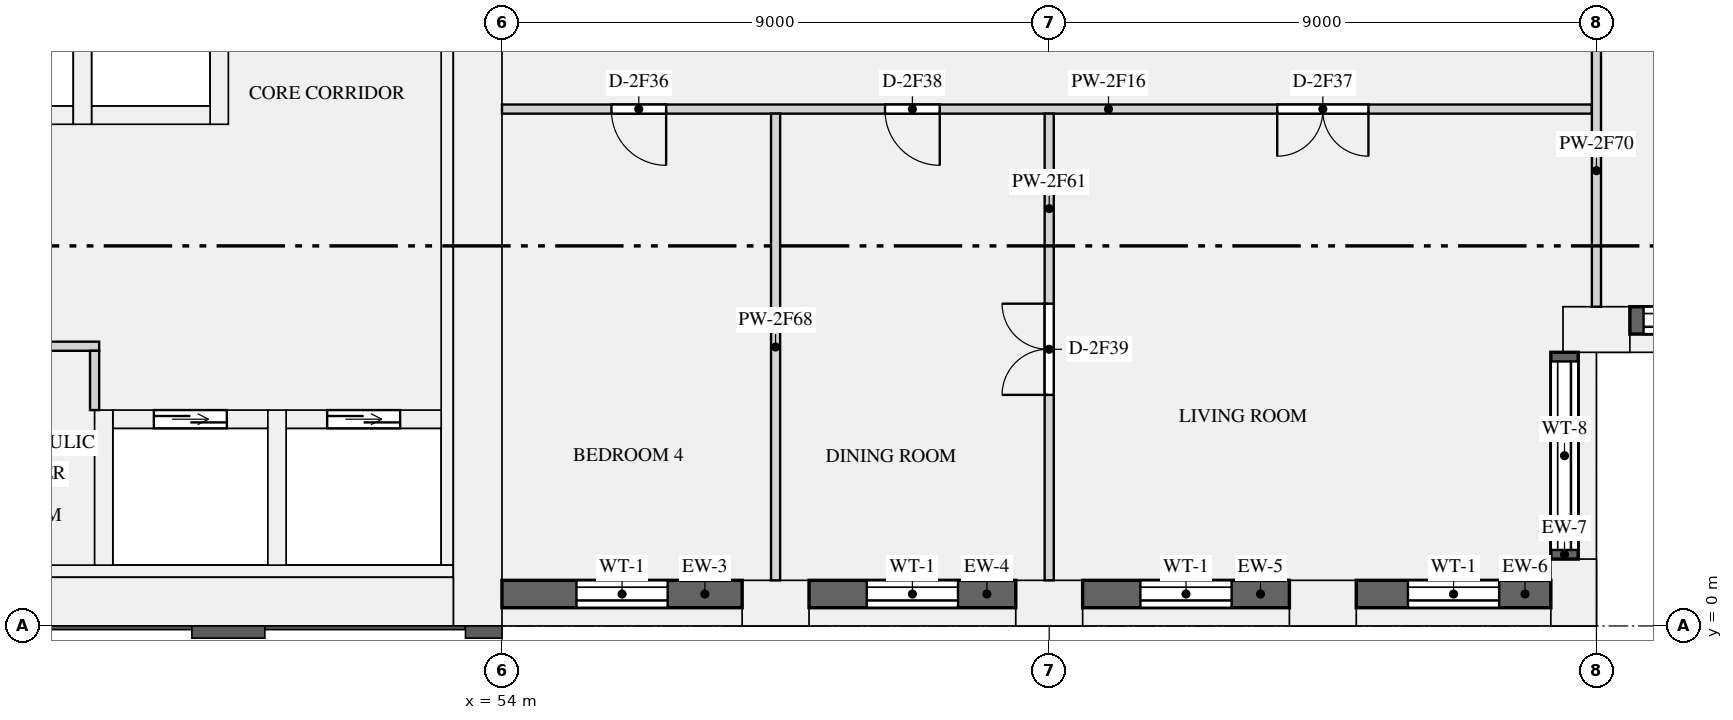
"""IFC4 building model, lengths in metres.
Left out: names, types, materials, properties, quantities, classifications, styles, units other than length and angle.
Written with IfcOpenShell. Run it as: python <this file> out.ifc"""

import sys

from ifc_helpers import new_model, si_unit, direction, frame, frame_2d, origin, origin_2d, place, context, subcontext, project, spatial, rectangle, extrude, element, fill, save


model = new_model("IFC4")
c1 = context("Model", 3, precision=1e-05, world=origin(), true_north=direction((0.0, 1.0)))
c2 = subcontext(c1, "Body", "Model", "MODEL_VIEW")
j1 = project(units=[si_unit("LENGTHUNIT", "METRE"), si_unit("PLANEANGLEUNIT", "RADIAN")], contexts=[c1])
p1 = place(None, origin())
s1 = spatial("IfcSite", under=j1, at=p1, CompositionType="ELEMENT")
p2 = place(p1, origin())
s2 = spatial("IfcBuilding", under=s1, at=p2, CompositionType="ELEMENT")
p3 = place(p2, frame((0.0, 0.0, 127.65)))
s3 = spatial("IfcBuildingStorey", under=s2, at=p3, CompositionType="ELEMENT", Elevation=127.65)
for number, where, z_axis, x_axis in (
    (1, (58.5, 0.375, 0.0), (0.0, 0.0, 1.0), (1.0, 0.0, 0.0)),
    (2, (63.0, 0.375, 0.0), (0.0, 0.0, 1.0), (1.0, 0.0, 0.0)),
    (3, (67.5, 0.375, 0.0), (0.0, 0.0, 1.0), (1.0, 0.0, 0.0)),
    (4, (71.625, 0.55, 0.0), (0.0, 0.0, 1.0), (0.0, 1.0, 0.0)),
    (5, (72.0, 4.875, 0.0), (0.0, 0.0, 1.0), (1.0, 0.0, 0.0)),
):
    element("IfcColumn", number, at=place(p3, frame(where, z_axis=z_axis, x_axis=x_axis)), inside=s3, PredefinedType="USERDEFINED", context=c2, shape_type="SweptSolid", body=[
        extrude(rectangle(XDim=1.1, YDim=0.75, at=origin_2d()), origin(), (0.0, 0.0, 1.0), 3.15),
    ])
p4 = place(p3, frame((53.6, 0.0, 0.0), z_axis=(0.0, 0.0, 1.0), x_axis=(0.0, 1.0, 0.0)))
e6 = element("IfcWall", 6, at=p4, inside=s3, PredefinedType="SHEAR", context=c2, shape_type="SweptSolid", body=[
    extrude(rectangle(XDim=12.5, YDim=0.8, at=frame_2d((6.25, 0.0))), origin(), (0.0, 0.0, 1.0), 3.15),
])
p5 = place(p3, frame((18.8, 0.4, 0.0), z_axis=(0.0, 0.0, 1.0), x_axis=(1.0, 0.0, 0.0)))
e7 = element("IfcWall", 7, at=p5, inside=s3, PredefinedType="SHEAR", context=c2, shape_type="SweptSolid", body=[
    extrude(rectangle(XDim=34.4, YDim=0.8, at=frame_2d((17.2, 0.0))), origin(), (0.0, 0.0, 1.0), 3.15),
])
p6 = place(p3, frame((53.1, 1.0, 0.0), z_axis=(0.0, 0.0, 1.0), x_axis=(0.0, 1.0, 0.0)))
e8 = element("IfcWall", 8, at=p6, inside=s3, PredefinedType="SHEAR", context=c2, shape_type="SweptSolid", body=[
    extrude(rectangle(XDim=10.9, YDim=0.2, at=frame_2d((5.45, 0.0))), origin(), (0.0, 0.0, 1.0), 3.15),
])
p7 = place(p3, frame((18.8, 0.9, 0.0), z_axis=(0.0, 0.0, 1.0), x_axis=(1.0, 0.0, 0.0)))
e9 = element("IfcWall", 9, at=p7, inside=s3, PredefinedType="SHEAR", context=c2, shape_type="SweptSolid", body=[
    extrude(rectangle(XDim=34.4, YDim=0.2, at=frame_2d((17.2, 0.0))), origin(), (0.0, 0.0, 1.0), 3.15),
])
for number, where, z_axis, x_axis in (
    (10, (45.0, 8.4, 0.0), (0.0, 0.0, 1.0), (1.0, 0.0, 0.0)),
    (11, (47.25, 8.4, 0.0), (0.0, 0.0, 1.0), (1.0, 0.0, 0.0)),
):
    element("IfcWall", number, at=place(p3, frame(where, z_axis=z_axis, x_axis=x_axis)), inside=s3, PredefinedType="SHEAR", context=c2, shape_type="SweptSolid", body=[
        extrude(rectangle(XDim=1.95, YDim=0.3, at=frame_2d((0.975, 0.0))), origin(), (0.0, 0.0, 1.0), 3.15),
    ])
for number, where, z_axis, x_axis in (
    (12, (47.1, 8.25, 0.0), (0.0, 0.0, 1.0), (0.0, 1.0, 0.0)),
    (13, (49.35, 8.25, 0.0), (0.0, 0.0, 1.0), (0.0, 1.0, 0.0)),
):
    element("IfcWall", number, at=place(p3, frame(where, z_axis=z_axis, x_axis=x_axis)), inside=s3, PredefinedType="SHEAR", context=c2, shape_type="SweptSolid", body=[
        extrude(rectangle(XDim=3.65, YDim=0.3, at=frame_2d((1.825, 0.0))), origin(), (0.0, 0.0, 1.0), 3.15),
    ])
p8 = place(p3, frame((47.6, 3.4, 0.0), z_axis=(0.0, 0.0, 1.0), x_axis=(1.0, 0.0, 0.0)))
e14 = element("IfcWall", 14, at=p8, inside=s3, PredefinedType="SHEAR", context=c2, shape_type="SweptSolid", body=[
    extrude(rectangle(XDim=2.55, YDim=0.3, at=frame_2d((1.275, 0.0))), origin(), (0.0, 0.0, 1.0), 3.15),
])
p9 = place(p8, frame((0.675, 0.0, 0.0)))
e15 = element("IfcOpeningElement", 15, at=p9, cuts=e14, PredefinedType="OPENING", context=c2, shape_type="SweptSolid", body=[
    extrude(rectangle(XDim=1.2, YDim=2.1, at=frame_2d((0.6, 1.05))), frame((0.0, 0.16, 0.0), z_axis=(0.0, -1.0, 0.0), x_axis=(1.0, 0.0, 0.0)), (0.0, 0.0, 1.0), 0.32),
])
p10 = place(p3, frame((47.45, 1.0, 0.0), z_axis=(0.0, 0.0, 1.0), x_axis=(0.0, 1.0, 0.0)))
e16 = element("IfcWall", 16, at=p10, inside=s3, PredefinedType="SHEAR", context=c2, shape_type="SweptSolid", body=[
    extrude(rectangle(XDim=2.55, YDim=0.3, at=frame_2d((1.275, 0.0))), origin(), (0.0, 0.0, 1.0), 3.15),
])
p11 = place(p3, frame((50.45, 3.4, 0.0), z_axis=(0.0, 0.0, 1.0), x_axis=(1.0, 0.0, 0.0)))
e17 = element("IfcWall", 17, at=p11, inside=s3, PredefinedType="SHEAR", context=c2, shape_type="SweptSolid", body=[
    extrude(rectangle(XDim=2.55, YDim=0.3, at=frame_2d((1.275, 0.0))), origin(), (0.0, 0.0, 1.0), 3.15),
])
p12 = place(p11, frame((0.675, 0.0, 0.0)))
e18 = element("IfcOpeningElement", 18, at=p12, cuts=e17, PredefinedType="OPENING", context=c2, shape_type="SweptSolid", body=[
    extrude(rectangle(XDim=1.2, YDim=2.1, at=frame_2d((0.6, 1.05))), frame((0.0, 0.16, 0.0), z_axis=(0.0, -1.0, 0.0), x_axis=(1.0, 0.0, 0.0)), (0.0, 0.0, 1.0), 0.32),
])
p13 = place(p3, frame((50.3, 1.0, 0.0), z_axis=(0.0, 0.0, 1.0), x_axis=(0.0, 1.0, 0.0)))
e19 = element("IfcWall", 19, at=p13, inside=s3, PredefinedType="SHEAR", context=c2, shape_type="SweptSolid", body=[
    extrude(rectangle(XDim=2.55, YDim=0.3, at=frame_2d((1.275, 0.0))), origin(), (0.0, 0.0, 1.0), 3.15),
])
p14 = place(p3, frame((54.0, 0.525, 0.9), z_axis=(0.0, 0.0, 1.0), x_axis=(1.0, 0.0, 0.0)))
e20 = element("IfcWall", 20, at=p14, inside=s3, PredefinedType="SOLIDWALL", context=c2, shape_type="SweptSolid", body=[
    extrude(rectangle(XDim=3.95, YDim=0.45, at=frame_2d((1.975, 0.0))), origin(), (0.0, 0.0, 1.0), 1.75),
])
p15 = place(p14, frame((1.225, 0.0, 0.15)))
e21 = element("IfcOpeningElement", 21, at=p15, cuts=e20, PredefinedType="OPENING", context=c2, shape_type="SweptSolid", body=[
    extrude(rectangle(XDim=1.5, YDim=1.5, at=frame_2d((0.75, 0.75))), frame((0.0, 0.235, 0.0), z_axis=(0.0, -1.0, 0.0), x_axis=(1.0, 0.0, 0.0)), (0.0, 0.0, 1.0), 0.47),
])
p16 = place(p3, frame((59.05, 0.525, 0.9), z_axis=(0.0, 0.0, 1.0), x_axis=(1.0, 0.0, 0.0)))
e22 = element("IfcWall", 22, at=p16, inside=s3, PredefinedType="SOLIDWALL", context=c2, shape_type="SweptSolid", body=[
    extrude(rectangle(XDim=3.4, YDim=0.45, at=frame_2d((1.7, 0.0))), origin(), (0.0, 0.0, 1.0), 1.75),
])
p17 = place(p16, frame((0.95, 0.0, 0.15)))
e23 = element("IfcOpeningElement", 23, at=p17, cuts=e22, PredefinedType="OPENING", context=c2, shape_type="SweptSolid", body=[
    extrude(rectangle(XDim=1.5, YDim=1.5, at=frame_2d((0.75, 0.75))), frame((0.0, 0.235, 0.0), z_axis=(0.0, -1.0, 0.0), x_axis=(1.0, 0.0, 0.0)), (0.0, 0.0, 1.0), 0.47),
])
p18 = place(p3, frame((63.55, 0.525, 0.9), z_axis=(0.0, 0.0, 1.0), x_axis=(1.0, 0.0, 0.0)))
e24 = element("IfcWall", 24, at=p18, inside=s3, PredefinedType="SOLIDWALL", context=c2, shape_type="SweptSolid", body=[
    extrude(rectangle(XDim=3.4, YDim=0.45, at=frame_2d((1.7, 0.0))), origin(), (0.0, 0.0, 1.0), 1.75),
])
p19 = place(p18, frame((0.95, 0.0, 0.15)))
e25 = element("IfcOpeningElement", 25, at=p19, cuts=e24, PredefinedType="OPENING", context=c2, shape_type="SweptSolid", body=[
    extrude(rectangle(XDim=1.5, YDim=1.5, at=frame_2d((0.75, 0.75))), frame((0.0, 0.235, 0.0), z_axis=(0.0, -1.0, 0.0), x_axis=(1.0, 0.0, 0.0)), (0.0, 0.0, 1.0), 0.47),
])
p20 = place(p3, frame((68.05, 0.525, 0.9), z_axis=(0.0, 0.0, 1.0), x_axis=(1.0, 0.0, 0.0)))
e26 = element("IfcWall", 26, at=p20, inside=s3, PredefinedType="SOLIDWALL", context=c2, shape_type="SweptSolid", body=[
    extrude(rectangle(XDim=3.2, YDim=0.45, at=frame_2d((1.6, 0.0))), origin(), (0.0, 0.0, 1.0), 1.75),
])
p21 = place(p20, frame((0.85, 0.0, 0.15)))
e27 = element("IfcOpeningElement", 27, at=p21, cuts=e26, PredefinedType="OPENING", context=c2, shape_type="SweptSolid", body=[
    extrude(rectangle(XDim=1.5, YDim=1.5, at=frame_2d((0.75, 0.75))), frame((0.0, 0.235, 0.0), z_axis=(0.0, -1.0, 0.0), x_axis=(1.0, 0.0, 0.0)), (0.0, 0.0, 1.0), 0.47),
])
p22 = place(p3, frame((71.475, 1.1, 0.9), z_axis=(0.0, 0.0, 1.0), x_axis=(0.0, 1.0, 0.0)))
e28 = element("IfcWall", 28, at=p22, inside=s3, PredefinedType="SOLIDWALL", context=c2, shape_type="SweptSolid", body=[
    extrude(rectangle(XDim=3.4, YDim=0.45, at=frame_2d((1.7, 0.0))), origin(), (0.0, 0.0, 1.0), 1.75),
])
p23 = place(p22, frame((0.15, 0.0, 0.15)))
e29 = element("IfcOpeningElement", 29, at=p23, cuts=e28, PredefinedType="OPENING", context=c2, shape_type="SweptSolid", body=[
    extrude(rectangle(XDim=3.1, YDim=1.5, at=frame_2d((1.55, 0.75))), frame((0.0, 0.235, 0.0), z_axis=(0.0, -1.0, 0.0), x_axis=(1.0, 0.0, 0.0)), (0.0, 0.0, 1.0), 0.47),
])
p24 = place(p3, frame((72.55, 5.025, 0.9), z_axis=(0.0, 0.0, 1.0), x_axis=(1.0, 0.0, 0.0)))
e30 = element("IfcWall", 30, at=p24, inside=s3, PredefinedType="SOLIDWALL", context=c2, shape_type="SweptSolid", body=[
    extrude(rectangle(XDim=3.2, YDim=0.45, at=frame_2d((1.6, 0.0))), origin(), (0.0, 0.0, 1.0), 1.75),
])
p25 = place(p24, frame((0.225, 0.0, 0.15)))
e31 = element("IfcOpeningElement", 31, at=p25, cuts=e30, PredefinedType="OPENING", context=c2, shape_type="SweptSolid", body=[
    extrude(rectangle(XDim=2.75, YDim=1.5, at=frame_2d((1.375, 0.75))), frame((0.0, 0.235, 0.0), z_axis=(0.0, -1.0, 0.0), x_axis=(1.0, 0.0, 0.0)), (0.0, 0.0, 1.0), 0.47),
])
p26 = place(p3, frame((44.7, 4.6, 0.0), z_axis=(0.0, 0.0, 1.0), x_axis=(1.0, 0.0, 0.0)))
e32 = element("IfcWall", 32, at=p26, inside=s3, PredefinedType="PARTITIONING", context=c2, shape_type="SweptSolid", body=[
    extrude(rectangle(XDim=2.675, YDim=0.15, at=frame_2d((1.337, 0.0))), origin(), (0.0, 0.0, 1.0), 2.65),
])
p27 = place(p26, frame((0.35, 0.0, 0.0)))
e33 = element("IfcOpeningElement", 33, at=p27, cuts=e32, PredefinedType="OPENING", context=c2, shape_type="SweptSolid", body=[
    extrude(rectangle(XDim=0.9, YDim=2.1, at=frame_2d((0.45, 1.05))), frame((0.0, 0.085, 0.0), z_axis=(0.0, -1.0, 0.0), x_axis=(1.0, 0.0, 0.0)), (0.0, 0.0, 1.0), 0.17),
])
p28 = place(p3, frame((47.3, 3.55, 0.0), z_axis=(0.0, 0.0, 1.0), x_axis=(0.0, 1.0, 0.0)))
e34 = element("IfcWall", 34, at=p28, inside=s3, PredefinedType="PARTITIONING", context=c2, shape_type="SweptSolid", body=[
    extrude(rectangle(XDim=0.975, YDim=0.15, at=frame_2d((0.487, 0.0))), origin(), (0.0, 0.0, 1.0), 2.65),
])
p29 = place(p3, frame((54.0, 8.5, 0.0), z_axis=(0.0, 0.0, 1.0), x_axis=(1.0, 0.0, 0.0)))
e35 = element("IfcWall", 35, at=p29, inside=s3, PredefinedType="PARTITIONING", context=c2, shape_type="SweptSolid", body=[
    extrude(rectangle(XDim=17.925, YDim=0.15, at=frame_2d((8.962, 0.0))), origin(), (0.0, 0.0, 1.0), 2.65),
])
p30 = place(p29, frame((1.8, 0.0, 0.0)))
e36 = element("IfcOpeningElement", 36, at=p30, cuts=e35, PredefinedType="OPENING", context=c2, shape_type="SweptSolid", body=[
    extrude(rectangle(XDim=0.9, YDim=2.1, at=frame_2d((0.45, 1.05))), frame((0.0, 0.085, 0.0), z_axis=(0.0, -1.0, 0.0), x_axis=(1.0, 0.0, 0.0)), (0.0, 0.0, 1.0), 0.17),
])
p31 = place(p29, frame((12.75, 0.0, 0.0)))
e37 = element("IfcOpeningElement", 37, at=p31, cuts=e35, PredefinedType="OPENING", context=c2, shape_type="SweptSolid", body=[
    extrude(rectangle(XDim=1.5, YDim=2.1, at=frame_2d((0.75, 1.05))), frame((0.0, 0.085, 0.0), z_axis=(0.0, -1.0, 0.0), x_axis=(1.0, 0.0, 0.0)), (0.0, 0.0, 1.0), 0.17),
])
p32 = place(p29, frame((6.3, 0.0, 0.0)))
e38 = element("IfcOpeningElement", 38, at=p32, cuts=e35, PredefinedType="OPENING", context=c2, shape_type="SweptSolid", body=[
    extrude(rectangle(XDim=0.9, YDim=2.1, at=frame_2d((0.45, 1.05))), frame((0.0, 0.085, 0.0), z_axis=(0.0, -1.0, 0.0), x_axis=(1.0, 0.0, 0.0)), (0.0, 0.0, 1.0), 0.17),
])
p33 = place(p3, frame((63.0, 0.75, 0.0), z_axis=(0.0, 0.0, 1.0), x_axis=(0.0, 1.0, 0.0)))
e39 = element("IfcWall", 39, at=p33, inside=s3, PredefinedType="PARTITIONING", context=c2, shape_type="SweptSolid", body=[
    extrude(rectangle(XDim=7.675, YDim=0.15, at=frame_2d((3.837, 0.0))), origin(), (0.0, 0.0, 1.0), 2.65),
])
p34 = place(p33, frame((3.05, 0.0, 0.0)))
e40 = element("IfcOpeningElement", 40, at=p34, cuts=e39, PredefinedType="OPENING", context=c2, shape_type="SweptSolid", body=[
    extrude(rectangle(XDim=1.5, YDim=2.1, at=frame_2d((0.75, 1.05))), frame((0.0, 0.085, 0.0), z_axis=(0.0, -1.0, 0.0), x_axis=(1.0, 0.0, 0.0)), (0.0, 0.0, 1.0), 0.17),
])
p35 = place(p3, frame((58.5, 0.75, 0.0), z_axis=(0.0, 0.0, 1.0), x_axis=(0.0, 1.0, 0.0)))
e41 = element("IfcWall", 41, at=p35, inside=s3, PredefinedType="PARTITIONING", context=c2, shape_type="SweptSolid", body=[
    extrude(rectangle(XDim=7.675, YDim=0.15, at=frame_2d((3.837, 0.0))), origin(), (0.0, 0.0, 1.0), 2.65),
])
p36 = place(p3, frame((72.0, 5.25, 0.0), z_axis=(0.0, 0.0, 1.0), x_axis=(0.0, 1.0, 0.0)))
e42 = element("IfcWall", 42, at=p36, inside=s3, PredefinedType="PARTITIONING", context=c2, shape_type="SweptSolid", body=[
    extrude(rectangle(XDim=11.175, YDim=0.15, at=frame_2d((5.587, 0.0))), origin(), (0.0, 0.0, 1.0), 2.65),
])
p37 = place(p36, frame((4.475, 0.0, 0.0)))
e43 = element("IfcOpeningElement", 43, at=p37, cuts=e42, PredefinedType="OPENING", context=c2, shape_type="SweptSolid", body=[
    extrude(rectangle(XDim=0.9, YDim=2.1, at=frame_2d((0.45, 1.05))), frame((0.0, 0.085, 0.0), z_axis=(0.0, -1.0, 0.0), x_axis=(1.0, 0.0, 0.0)), (0.0, 0.0, 1.0), 0.17),
])
p38 = place(p36, frame((9.125, 0.0, 0.0)))
e44 = element("IfcOpeningElement", 44, at=p38, cuts=e42, PredefinedType="OPENING", context=c2, shape_type="SweptSolid", body=[
    extrude(rectangle(XDim=0.9, YDim=2.1, at=frame_2d((0.45, 1.05))), frame((0.0, 0.085, 0.0), z_axis=(0.0, -1.0, 0.0), x_axis=(1.0, 0.0, 0.0)), (0.0, 0.0, 1.0), 0.17),
])
p39 = place(p15, origin())
e45 = element("IfcWindow", 45, at=p39, inside=s3, PartitioningType="SINGLE_PANEL", PredefinedType="WINDOW", context=c2, shape_type="SweptSolid", body=[
    extrude(rectangle(XDim=1.5, YDim=1.5, at=frame_2d((0.75, 0.75))), frame((0.0, -0.065, 0.0), z_axis=(0.0, -1.0, 0.0), x_axis=(1.0, 0.0, 0.0)), (0.0, 0.0, 1.0), 0.06),
])
fill(e21, e45)
p40 = place(p17, origin())
e46 = element("IfcWindow", 46, at=p40, inside=s3, PartitioningType="SINGLE_PANEL", PredefinedType="WINDOW", context=c2, shape_type="SweptSolid", body=[
    extrude(rectangle(XDim=1.5, YDim=1.5, at=frame_2d((0.75, 0.75))), frame((0.0, -0.065, 0.0), z_axis=(0.0, -1.0, 0.0), x_axis=(1.0, 0.0, 0.0)), (0.0, 0.0, 1.0), 0.06),
])
fill(e23, e46)
p41 = place(p19, origin())
e47 = element("IfcWindow", 47, at=p41, inside=s3, PartitioningType="SINGLE_PANEL", PredefinedType="WINDOW", context=c2, shape_type="SweptSolid", body=[
    extrude(rectangle(XDim=1.5, YDim=1.5, at=frame_2d((0.75, 0.75))), frame((0.0, -0.065, 0.0), z_axis=(0.0, -1.0, 0.0), x_axis=(1.0, 0.0, 0.0)), (0.0, 0.0, 1.0), 0.06),
])
fill(e25, e47)
p42 = place(p21, origin())
e48 = element("IfcWindow", 48, at=p42, inside=s3, PartitioningType="SINGLE_PANEL", PredefinedType="WINDOW", context=c2, shape_type="SweptSolid", body=[
    extrude(rectangle(XDim=1.5, YDim=1.5, at=frame_2d((0.75, 0.75))), frame((0.0, -0.065, 0.0), z_axis=(0.0, -1.0, 0.0), x_axis=(1.0, 0.0, 0.0)), (0.0, 0.0, 1.0), 0.06),
])
fill(e27, e48)
p43 = place(p23, origin())
e49 = element("IfcWindow", 49, at=p43, inside=s3, PartitioningType="SINGLE_PANEL", PredefinedType="WINDOW", context=c2, shape_type="SweptSolid", body=[
    extrude(rectangle(XDim=3.1, YDim=1.5, at=frame_2d((1.55, 0.75))), frame((0.0, -0.065, 0.0), z_axis=(0.0, -1.0, 0.0), x_axis=(1.0, 0.0, 0.0)), (0.0, 0.0, 1.0), 0.06),
])
fill(e29, e49)
p44 = place(p25, origin())
e50 = element("IfcWindow", 50, at=p44, inside=s3, PartitioningType="SINGLE_PANEL", PredefinedType="WINDOW", context=c2, shape_type="SweptSolid", body=[
    extrude(rectangle(XDim=2.75, YDim=1.5, at=frame_2d((1.375, 0.75))), frame((0.0, -0.065, 0.0), z_axis=(0.0, -1.0, 0.0), x_axis=(1.0, 0.0, 0.0)), (0.0, 0.0, 1.0), 0.06),
])
fill(e31, e50)
p45 = place(p9, origin())
e51 = element("IfcDoor", 51, at=p45, inside=s3, OperationType="DOUBLE_DOOR_SLIDING", PredefinedType="DOOR", context=c2, shape_type="SweptSolid", body=[
    extrude(rectangle(XDim=1.2, YDim=2.1, at=frame_2d((0.6, 1.05))), frame((0.0, 0.025, 0.0), z_axis=(0.0, -1.0, 0.0), x_axis=(1.0, 0.0, 0.0)), (0.0, 0.0, 1.0), 0.05),
])
fill(e15, e51)
p46 = place(p12, origin())
e52 = element("IfcDoor", 52, at=p46, inside=s3, OperationType="DOUBLE_DOOR_SLIDING", PredefinedType="DOOR", context=c2, shape_type="SweptSolid", body=[
    extrude(rectangle(XDim=1.2, YDim=2.1, at=frame_2d((0.6, 1.05))), frame((0.0, 0.025, 0.0), z_axis=(0.0, -1.0, 0.0), x_axis=(1.0, 0.0, 0.0)), (0.0, 0.0, 1.0), 0.05),
])
fill(e18, e52)
p47 = place(p30, frame((0.9, 0.0, 0.0), z_axis=(0.0, 0.0, 1.0), x_axis=(-1.0, 0.0, 0.0)))
e53 = element("IfcDoor", 53, at=p47, inside=s3, OperationType="SINGLE_SWING_LEFT", PredefinedType="DOOR", context=c2, shape_type="SweptSolid", body=[
    extrude(rectangle(XDim=0.9, YDim=2.1, at=frame_2d((0.45, 1.05))), frame((0.0, 0.025, 0.0), z_axis=(0.0, -1.0, 0.0), x_axis=(1.0, 0.0, 0.0)), (0.0, 0.0, 1.0), 0.05),
])
fill(e36, e53)
p48 = place(p31, frame((1.5, 0.0, 0.0), z_axis=(0.0, 0.0, 1.0), x_axis=(-1.0, 0.0, 0.0)))
e54 = element("IfcDoor", 54, at=p48, inside=s3, OperationType="DOUBLE_DOOR_SINGLE_SWING", PredefinedType="DOOR", context=c2, shape_type="SweptSolid", body=[
    extrude(rectangle(XDim=1.5, YDim=2.1, at=frame_2d((0.75, 1.05))), frame((0.0, 0.025, 0.0), z_axis=(0.0, -1.0, 0.0), x_axis=(1.0, 0.0, 0.0)), (0.0, 0.0, 1.0), 0.05),
])
fill(e37, e54)
p49 = place(p32, frame((0.9, 0.0, 0.0), z_axis=(0.0, 0.0, 1.0), x_axis=(-1.0, 0.0, 0.0)))
e55 = element("IfcDoor", 55, at=p49, inside=s3, OperationType="SINGLE_SWING_LEFT", PredefinedType="DOOR", context=c2, shape_type="SweptSolid", body=[
    extrude(rectangle(XDim=0.9, YDim=2.1, at=frame_2d((0.45, 1.05))), frame((0.0, 0.025, 0.0), z_axis=(0.0, -1.0, 0.0), x_axis=(1.0, 0.0, 0.0)), (0.0, 0.0, 1.0), 0.05),
])
fill(e38, e55)
p50 = place(p34, origin())
e56 = element("IfcDoor", 56, at=p50, inside=s3, OperationType="DOUBLE_DOOR_SINGLE_SWING", PredefinedType="DOOR", context=c2, shape_type="SweptSolid", body=[
    extrude(rectangle(XDim=1.5, YDim=2.1, at=frame_2d((0.75, 1.05))), frame((0.0, 0.025, 0.0), z_axis=(0.0, -1.0, 0.0), x_axis=(1.0, 0.0, 0.0)), (0.0, 0.0, 1.0), 0.05),
])
fill(e40, e56)
save(model, sys.argv[1])
